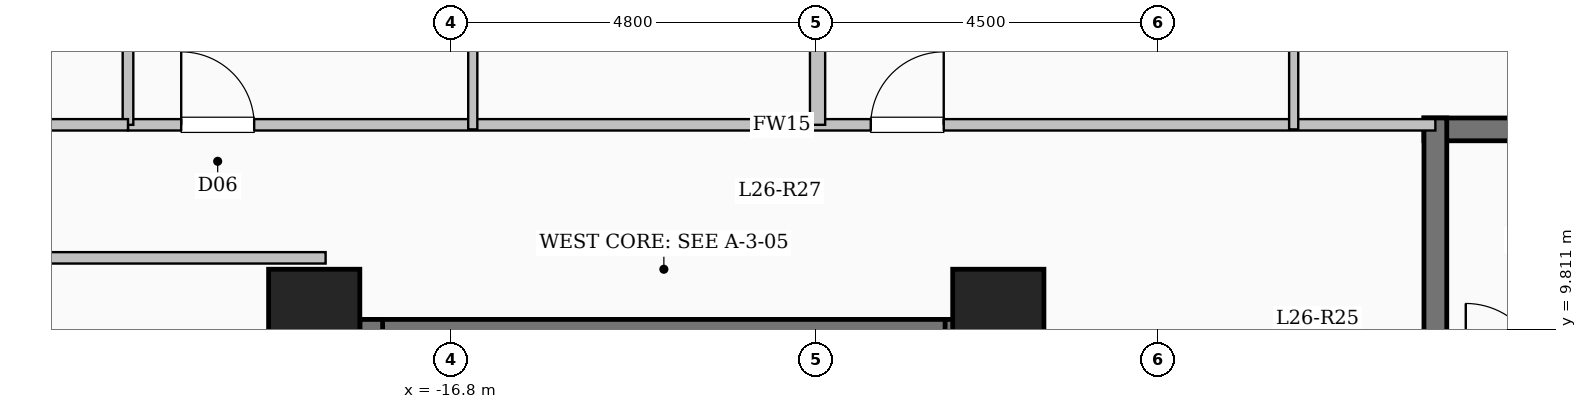
"""IFC4 building model, lengths in metres.
Left out: names, types, materials, properties, quantities, classifications, styles, units other than length and angle.
Written with IfcOpenShell. Run it as: python <this file> out.ifc"""

import sys

from ifc_helpers import new_model, si_unit, direction, frame, frame_2d, origin, origin_2d, place, context, subcontext, project, spatial, rectangle, extrude, element, fill, save


model = new_model("IFC4")
c1 = context("Model", 3, precision=1e-05, world=origin(), true_north=direction((0.0, 1.0)))
c2 = subcontext(c1, "Body", "Model", "MODEL_VIEW")
j1 = project(units=[si_unit("LENGTHUNIT", "METRE"), si_unit("PLANEANGLEUNIT", "RADIAN")], contexts=[c1])
p1 = place(None, origin())
s1 = spatial("IfcSite", under=j1, at=p1, CompositionType="ELEMENT")
p2 = place(p1, origin())
s2 = spatial("IfcBuilding", under=s1, at=p2, CompositionType="ELEMENT")
p3 = place(p2, frame((0.0, 0.0, 98.4)))
s3 = spatial("IfcBuildingStorey", under=s2, at=p3, CompositionType="ELEMENT", Elevation=98.4)
for number, where, z_axis, x_axis in (
    (1, (-9.6, 10.0, 0.0), (0.0, 0.0, 1.0), (1.0, 0.0, 0.0)),
    (2, (-18.6, 10.0, 0.0), (0.0, 0.0, 1.0), (1.0, 0.0, 0.0)),
):
    element("IfcColumn", number, at=place(p3, frame(where, z_axis=z_axis, x_axis=x_axis)), inside=s3, PredefinedType="COLUMN", context=c2, shape_type="SweptSolid", body=[
        extrude(rectangle(XDim=1.2, YDim=1.2, at=origin_2d()), origin(), (0.0, 0.0, 1.0), 3.35),
    ])
p4 = place(p3, frame((-18.0, 9.79, 0.0), z_axis=(0.0, 0.0, 1.0), x_axis=(1.0, 0.0, 0.0)))
e3 = element("IfcWall", 3, at=p4, inside=s3, PredefinedType="SHEAR", context=c2, shape_type="SweptSolid", body=[
    extrude(rectangle(XDim=8.0, YDim=0.3, at=frame_2d((4.0, 0.0))), origin(), (0.0, 0.0, 1.0), 3.35),
])
for number, where, z_axis, x_axis in (
    (4, (-17.85, 6.35, 0.0), (0.0, 0.0, 1.0), (0.0, 1.0, 0.0)),
    (5, (-10.15, 6.35, 0.0), (0.0, 0.0, 1.0), (0.0, 1.0, 0.0)),
):
    element("IfcWall", number, at=place(p3, frame(where, z_axis=z_axis, x_axis=x_axis)), inside=s3, PredefinedType="SHEAR", context=c2, shape_type="SweptSolid", body=[
        extrude(rectangle(XDim=3.59, YDim=0.3, at=frame_2d((1.795, 0.0))), origin(), (0.0, 0.0, 1.0), 3.35),
    ])
p5 = place(p3, frame((-4.0, 12.44, 0.0), z_axis=(0.0, 0.0, 1.0), x_axis=(1.0, 0.0, 0.0)))
e6 = element("IfcWall", 6, at=p5, inside=s3, PredefinedType="SHEAR", context=c2, shape_type="SweptSolid", body=[
    extrude(rectangle(XDim=8.0, YDim=0.3, at=frame_2d((4.0, 0.0))), origin(), (0.0, 0.0, 1.0), 3.35),
])
p6 = place(p3, frame((-3.85, 9.0, 0.0), z_axis=(0.0, 0.0, 1.0), x_axis=(0.0, 1.0, 0.0)))
e7 = element("IfcWall", 7, at=p6, inside=s3, PredefinedType="SHEAR", context=c2, shape_type="SweptSolid", body=[
    extrude(rectangle(XDim=3.59, YDim=0.3, at=frame_2d((1.795, 0.0))), origin(), (0.0, 0.0, 1.0), 3.35),
])
p7 = place(p3, frame((-21.05, 12.5, 0.0), z_axis=(0.0, 0.0, 1.0), x_axis=(1.0, 0.0, 0.0)))
e8 = element("IfcWall", 8, at=p7, inside=s3, PredefinedType="PARTITIONING", context=c2, shape_type="SweptSolid", body=[
    extrude(rectangle(XDim=17.2, YDim=0.15, at=frame_2d((8.6, 0.0))), origin(), (0.0, 0.0, 1.0), 3.1),
])
p8 = place(p7, frame((0.7, 0.0, 0.0)))
e9 = element("IfcOpeningElement", 9, at=p8, cuts=e8, PredefinedType="OPENING", context=c2, shape_type="SweptSolid", body=[
    extrude(rectangle(XDim=0.96, YDim=2.15, at=frame_2d((0.48, 1.075))), frame((0.0, 0.085, 0.0), z_axis=(0.0, -1.0, 0.0), x_axis=(1.0, 0.0, 0.0)), (0.0, 0.0, 1.0), 0.17),
])
p9 = place(p7, frame((9.772, 0.0, 0.0)))
e10 = element("IfcOpeningElement", 10, at=p9, cuts=e8, PredefinedType="OPENING", context=c2, shape_type="SweptSolid", body=[
    extrude(rectangle(XDim=0.96, YDim=2.15, at=frame_2d((0.48, 1.075))), frame((0.0, 0.085, 0.0), z_axis=(0.0, -1.0, 0.0), x_axis=(1.0, 0.0, 0.0)), (0.0, 0.0, 1.0), 0.17),
])
p10 = place(p3, frame((-11.978, 12.5, 0.0), z_axis=(0.0, 0.0, 1.0), x_axis=(0.0, 1.0, 0.0)))
e11 = element("IfcWall", 11, at=p10, inside=s3, PredefinedType="SOLIDWALL", context=c2, shape_type="SweptSolid", body=[
    extrude(rectangle(XDim=9.6, YDim=0.2, at=frame_2d((4.8, 0.0))), origin(), (0.0, 0.0, 1.0), 3.1),
])
p11 = place(p3, frame((-16.514, 12.44, 0.0), z_axis=(0.0, 0.0, 1.0), x_axis=(0.0, 1.0, 0.0)))
e12 = element("IfcWall", 12, at=p11, inside=s3, PredefinedType="PARTITIONING", context=c2, shape_type="SweptSolid", body=[
    extrude(rectangle(XDim=3.21, YDim=0.12, at=frame_2d((1.605, 0.0))), origin(), (0.0, 0.0, 1.0), 3.1),
])
p12 = place(p11, frame((1.195, 0.0, 0.0)))
e13 = element("IfcOpeningElement", 13, at=p12, cuts=e12, PredefinedType="OPENING", context=c2, shape_type="SweptSolid", body=[
    extrude(rectangle(XDim=0.88, YDim=2.1, at=frame_2d((0.44, 1.05))), frame((0.0, 0.07, 0.0), z_axis=(0.0, -1.0, 0.0), x_axis=(1.0, 0.0, 0.0)), (0.0, 0.0, 1.0), 0.14),
])
p13 = place(p3, frame((-5.714, 12.44, 0.0), z_axis=(0.0, 0.0, 1.0), x_axis=(0.0, 1.0, 0.0)))
e14 = element("IfcWall", 14, at=p13, inside=s3, PredefinedType="PARTITIONING", context=c2, shape_type="SweptSolid", body=[
    extrude(rectangle(XDim=10.964, YDim=0.12, at=frame_2d((5.482, 0.0))), origin(), (0.0, 0.0, 1.0), 3.1),
])
p14 = place(p13, frame((3.075, 0.0, 0.0)))
e15 = element("IfcOpeningElement", 15, at=p14, cuts=e14, PredefinedType="OPENING", context=c2, shape_type="SweptSolid", body=[
    extrude(rectangle(XDim=1.08, YDim=2.15, at=frame_2d((0.54, 1.075))), frame((0.0, 0.07, 0.0), z_axis=(0.0, -1.0, 0.0), x_axis=(1.0, 0.0, 0.0)), (0.0, 0.0, 1.0), 0.14),
])
p15 = place(p3, frame((-26.88, 10.75, 0.0), z_axis=(0.0, 0.0, 1.0), x_axis=(1.0, 0.0, 0.0)))
e16 = element("IfcWall", 16, at=p15, inside=s3, PredefinedType="PARTITIONING", context=c2, shape_type="SweptSolid", body=[
    extrude(rectangle(XDim=8.43, YDim=0.15, at=frame_2d((4.215, 0.0))), origin(), (0.0, 0.0, 1.0), 3.1),
])
p16 = place(p3, frame((-21.05, 12.5, 0.0), z_axis=(0.0, 0.0, 1.0), x_axis=(0.0, 1.0, 0.0)))
e17 = element("IfcWall", 17, at=p16, inside=s3, PredefinedType="PARTITIONING", context=c2, shape_type="SweptSolid", body=[
    extrude(rectangle(XDim=5.35, YDim=0.14, at=frame_2d((2.675, 0.0))), origin(), (0.0, 0.0, 1.0), 3.1),
])
p17 = place(p3, frame((-26.88, 12.5, 0.0), z_axis=(0.0, 0.0, 1.0), x_axis=(1.0, 0.0, 0.0)))
e18 = element("IfcWall", 18, at=p17, inside=s3, PredefinedType="PARTITIONING", context=c2, shape_type="SweptSolid", body=[
    extrude(rectangle(XDim=5.83, YDim=0.15, at=frame_2d((2.915, 0.0))), origin(), (0.0, 0.0, 1.0), 3.1),
])
p18 = place(p17, frame((2.44, 0.0, 0.0)))
e19 = element("IfcOpeningElement", 19, at=p18, cuts=e18, PredefinedType="OPENING", context=c2, shape_type="SweptSolid", body=[
    extrude(rectangle(XDim=0.95, YDim=2.15, at=frame_2d((0.475, 1.075))), frame((0.0, 0.085, 0.0), z_axis=(0.0, -1.0, 0.0), x_axis=(1.0, 0.0, 0.0)), (0.0, 0.0, 1.0), 0.17),
])
p19 = place(p8, origin())
e20 = element("IfcDoor", 20, at=p19, inside=s3, OperationType="SINGLE_SWING_LEFT", PredefinedType="DOOR", context=c2, shape_type="SweptSolid", body=[
    extrude(rectangle(XDim=0.96, YDim=2.15, at=frame_2d((0.48, 1.075))), frame((0.0, 0.025, 0.0), z_axis=(0.0, -1.0, 0.0), x_axis=(1.0, 0.0, 0.0)), (0.0, 0.0, 1.0), 0.05),
])
fill(e9, e20)
p20 = place(p9, origin())
e21 = element("IfcDoor", 21, at=p20, inside=s3, OperationType="SINGLE_SWING_RIGHT", PredefinedType="DOOR", context=c2, shape_type="SweptSolid", body=[
    extrude(rectangle(XDim=0.96, YDim=2.15, at=frame_2d((0.48, 1.075))), frame((0.0, 0.025, 0.0), z_axis=(0.0, -1.0, 0.0), x_axis=(1.0, 0.0, 0.0)), (0.0, 0.0, 1.0), 0.05),
])
fill(e10, e21)
save(model, sys.argv[1])
